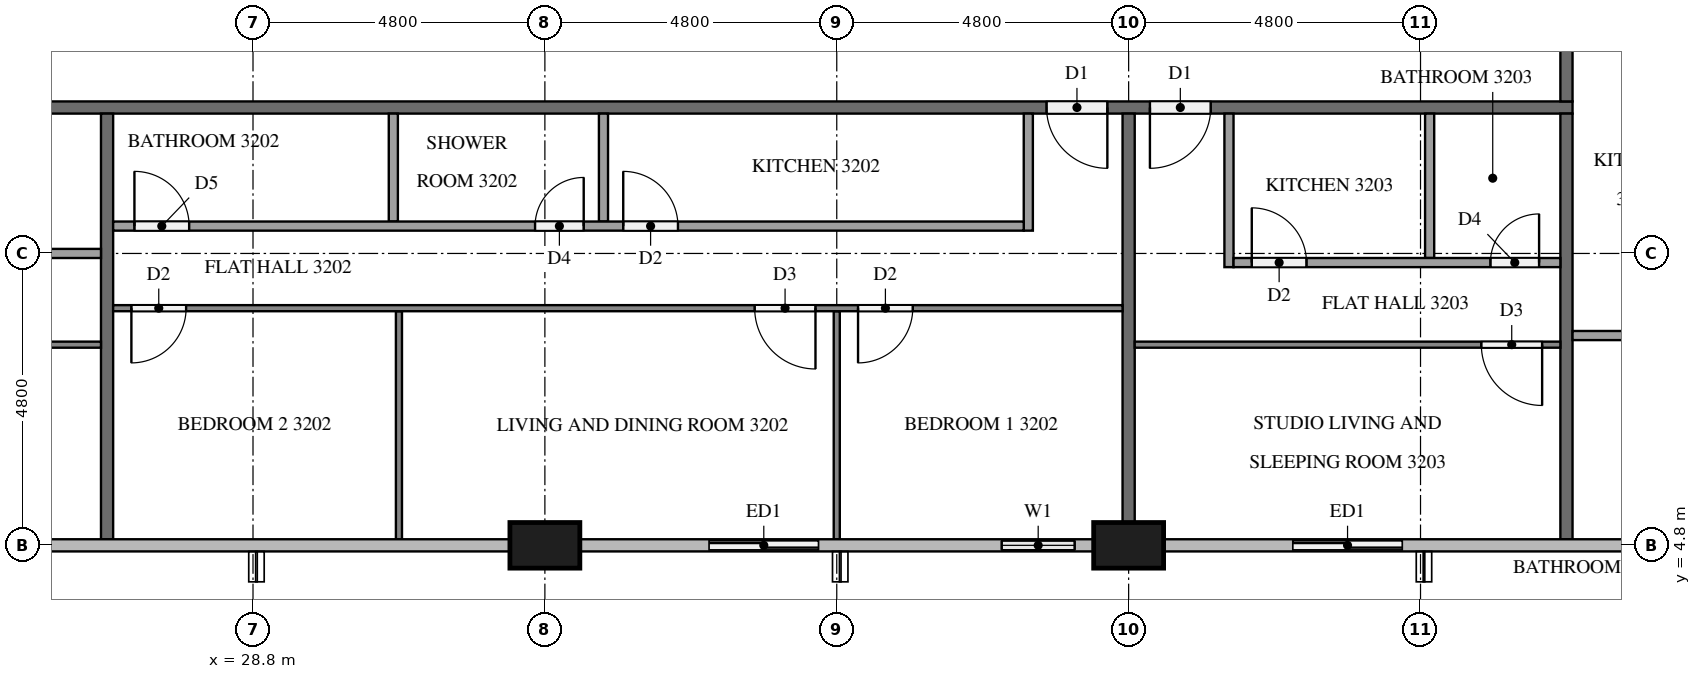
"""IFC4 building model, lengths in metres.
Left out: names, types, materials, properties, quantities, classifications, styles, units other than length and angle.
Written with IfcOpenShell. Run it as: python <this file> out.ifc"""

import sys

from ifc_helpers import new_model, si_unit, direction, frame, frame_2d, origin, origin_2d, place, context, subcontext, project, spatial, rectangle, extrude, element, fill, save


model = new_model("IFC4")
c1 = context("Model", 3, precision=1e-05, world=origin(), true_north=direction((0.0, 1.0)))
c2 = subcontext(c1, "Body", "Model", "MODEL_VIEW")
j1 = project(units=[si_unit("LENGTHUNIT", "METRE"), si_unit("PLANEANGLEUNIT", "RADIAN")], contexts=[c1])
p1 = place(None, origin())
s1 = spatial("IfcSite", under=j1, at=p1, CompositionType="ELEMENT")
p2 = place(p1, origin())
s2 = spatial("IfcBuilding", under=s1, at=p2, CompositionType="ELEMENT")
p3 = place(p2, frame((0.0, 0.0, 126.1)))
s3 = spatial("IfcBuildingStorey", under=s2, at=p3, CompositionType="ELEMENT", Elevation=126.1)
for number, where, z_axis, x_axis in (
    (1, (33.6, 4.8, 0.0), (0.0, 0.0, 1.0), (1.0, 0.0, 0.0)),
    (2, (43.2, 4.8, 0.0), (0.0, 0.0, 1.0), (1.0, 0.0, 0.0)),
):
    element("IfcColumn", number, at=place(p3, frame(where, z_axis=z_axis, x_axis=x_axis)), inside=s3, PredefinedType="COLUMN", context=c2, shape_type="SweptSolid", body=[
        extrude(rectangle(XDim=1.15, YDim=0.75, at=origin_2d()), origin(), (0.0, 0.0, 1.0), 3.2),
    ])
p4 = place(p3, frame((36.0, 4.8, 0.0), z_axis=(0.0, 0.0, 1.0), x_axis=(1.0, 0.0, 0.0)))
e3 = element("IfcWall", 3, at=p4, inside=s3, PredefinedType="SOLIDWALL", context=c2, shape_type="SweptSolid", body=[
    extrude(rectangle(XDim=2.4, YDim=0.15, at=frame_2d((1.2, 0.0))), origin(), (0.0, 0.0, 1.0), 3.2),
])
p5 = place(p4, frame((0.3, 0.0, 0.0)))
e4 = element("IfcOpeningElement", 4, at=p5, cuts=e3, PredefinedType="OPENING", context=c2, shape_type="SweptSolid", body=[
    extrude(rectangle(XDim=1.8, YDim=2.4, at=frame_2d((0.9, 1.2))), frame((0.0, 0.085, 0.0), z_axis=(0.0, -1.0, 0.0), x_axis=(1.0, 0.0, 0.0)), (0.0, 0.0, 1.0), 0.17),
])
p6 = place(p3, frame((40.8, 4.8, 0.0), z_axis=(0.0, 0.0, 1.0), x_axis=(1.0, 0.0, 0.0)))
e5 = element("IfcWall", 5, at=p6, inside=s3, PredefinedType="SOLIDWALL", context=c2, shape_type="SweptSolid", body=[
    extrude(rectangle(XDim=1.825, YDim=0.15, at=frame_2d((0.913, 0.0))), origin(), (0.0, 0.0, 1.0), 3.2),
])
p7 = place(p6, frame((0.312, 0.0, 0.9)))
e6 = element("IfcOpeningElement", 6, at=p7, cuts=e5, PredefinedType="OPENING", context=c2, shape_type="SweptSolid", body=[
    extrude(rectangle(XDim=1.2, YDim=1.4, at=frame_2d((0.6, 0.7))), frame((0.0, 0.085, 0.0), z_axis=(0.0, -1.0, 0.0), x_axis=(1.0, 0.0, 0.0)), (0.0, 0.0, 1.0), 0.17),
])
p8 = place(p3, frame((45.6, 4.8, 0.0), z_axis=(0.0, 0.0, 1.0), x_axis=(1.0, 0.0, 0.0)))
e7 = element("IfcWall", 7, at=p8, inside=s3, PredefinedType="SOLIDWALL", context=c2, shape_type="SweptSolid", body=[
    extrude(rectangle(XDim=2.4, YDim=0.15, at=frame_2d((1.2, 0.0))), origin(), (0.0, 0.0, 1.0), 3.2),
])
p9 = place(p8, frame((0.3, 0.0, 0.0)))
e8 = element("IfcOpeningElement", 8, at=p9, cuts=e7, PredefinedType="OPENING", context=c2, shape_type="SweptSolid", body=[
    extrude(rectangle(XDim=1.8, YDim=2.4, at=frame_2d((0.9, 1.2))), frame((0.0, 0.085, 0.0), z_axis=(0.0, -1.0, 0.0), x_axis=(1.0, 0.0, 0.0)), (0.0, 0.0, 1.0), 0.17),
])
p10 = place(p3, frame((50.5, 12.0, 0.0), z_axis=(0.0, 0.0, 1.0), x_axis=(-1.0, 0.0, 0.0)))
e9 = element("IfcWall", 9, at=p10, inside=s3, PredefinedType="PARTITIONING", context=c2, shape_type="SweptSolid", body=[
    extrude(rectangle(XDim=38.6, YDim=0.2, at=frame_2d((19.3, 0.0))), origin(), (0.0, 0.0, 1.0), 3.2),
])
p11 = place(p10, frame((37.15, 0.0, 0.0)))
e10 = element("IfcOpeningElement", 10, at=p11, cuts=e9, PredefinedType="OPENING", context=c2, shape_type="SweptSolid", body=[
    extrude(rectangle(XDim=1.0, YDim=2.1, at=frame_2d((0.5, 1.05))), frame((0.0, 0.11, 0.0), z_axis=(0.0, -1.0, 0.0), x_axis=(1.0, 0.0, 0.0)), (0.0, 0.0, 1.0), 0.22),
])
p12 = place(p10, frame((7.65, 0.0, 0.0)))
e11 = element("IfcOpeningElement", 11, at=p12, cuts=e9, PredefinedType="OPENING", context=c2, shape_type="SweptSolid", body=[
    extrude(rectangle(XDim=1.0, YDim=2.1, at=frame_2d((0.5, 1.05))), frame((0.0, 0.11, 0.0), z_axis=(0.0, -1.0, 0.0), x_axis=(1.0, 0.0, 0.0)), (0.0, 0.0, 1.0), 0.22),
])
p13 = place(p10, frame((5.95, 0.0, 0.0)))
e12 = element("IfcOpeningElement", 12, at=p13, cuts=e9, PredefinedType="OPENING", context=c2, shape_type="SweptSolid", body=[
    extrude(rectangle(XDim=1.0, YDim=2.1, at=frame_2d((0.5, 1.05))), frame((0.0, 0.11, 0.0), z_axis=(0.0, -1.0, 0.0), x_axis=(1.0, 0.0, 0.0)), (0.0, 0.0, 1.0), 0.22),
])
p14 = place(p3, frame((50.4, 14.9, 0.0), z_axis=(0.0, 0.0, 1.0), x_axis=(0.0, -1.0, 0.0)))
e13 = element("IfcWall", 13, at=p14, inside=s3, PredefinedType="PARTITIONING", context=c2, shape_type="SweptSolid", body=[
    extrude(rectangle(XDim=2.8, YDim=0.2, at=frame_2d((1.4, 0.0))), origin(), (0.0, 0.0, 1.0), 3.2),
])
p15 = place(p14, frame((0.25, 0.0, 0.0)))
e14 = element("IfcOpeningElement", 14, at=p15, cuts=e13, PredefinedType="OPENING", context=c2, shape_type="SweptSolid", body=[
    extrude(rectangle(XDim=1.0, YDim=2.1, at=frame_2d((0.5, 1.05))), frame((0.0, 0.11, 0.0), z_axis=(0.0, -1.0, 0.0), x_axis=(1.0, 0.0, 0.0)), (0.0, 0.0, 1.0), 0.22),
])
p16 = place(p3, frame((26.4, 11.9, 0.0), z_axis=(0.0, 0.0, 1.0), x_axis=(0.0, -1.0, 0.0)))
e15 = element("IfcWall", 15, at=p16, inside=s3, PredefinedType="PARTITIONING", context=c2, shape_type="SweptSolid", body=[
    extrude(rectangle(XDim=7.0, YDim=0.2, at=frame_2d((3.5, 0.0))), origin(), (0.0, 0.0, 1.0), 3.2),
])
p17 = place(p3, frame((43.2, 11.9, 0.0), z_axis=(0.0, 0.0, 1.0), x_axis=(0.0, -1.0, 0.0)))
e16 = element("IfcWall", 16, at=p17, inside=s3, PredefinedType="PARTITIONING", context=c2, shape_type="SweptSolid", body=[
    extrude(rectangle(XDim=6.725, YDim=0.2, at=frame_2d((3.362, 0.0))), origin(), (0.0, 0.0, 1.0), 3.2),
])
p18 = place(p3, frame((50.4, 11.9, 0.0), z_axis=(0.0, 0.0, 1.0), x_axis=(0.0, -1.0, 0.0)))
e17 = element("IfcWall", 17, at=p18, inside=s3, PredefinedType="PARTITIONING", context=c2, shape_type="SweptSolid", body=[
    extrude(rectangle(XDim=7.0, YDim=0.2, at=frame_2d((3.5, 0.0))), origin(), (0.0, 0.0, 1.0), 3.2),
])
p19 = place(p3, frame((26.3, 8.1, 0.0), z_axis=(0.0, 0.0, 1.0), x_axis=(-1.0, 0.0, 0.0)))
e18 = element("IfcWall", 18, at=p19, inside=s3, PredefinedType="PARTITIONING", context=c2, shape_type="SweptSolid", body=[
    extrude(rectangle(XDim=14.2, YDim=0.1, at=frame_2d((7.1, 0.0))), origin(), (0.0, 0.0, 1.0), 3.2),
])
p20 = place(p19, frame((13.0, 0.0, 0.0)))
e19 = element("IfcOpeningElement", 19, at=p20, cuts=e18, PredefinedType="OPENING", context=c2, shape_type="SweptSolid", body=[
    extrude(rectangle(XDim=0.9, YDim=2.1, at=frame_2d((0.45, 1.05))), frame((0.0, 0.06, 0.0), z_axis=(0.0, -1.0, 0.0), x_axis=(1.0, 0.0, 0.0)), (0.0, 0.0, 1.0), 0.12),
])
p21 = place(p19, frame((5.05, 0.0, 0.0)))
e20 = element("IfcOpeningElement", 20, at=p21, cuts=e18, PredefinedType="OPENING", context=c2, shape_type="SweptSolid", body=[
    extrude(rectangle(XDim=0.9, YDim=2.1, at=frame_2d((0.45, 1.05))), frame((0.0, 0.06, 0.0), z_axis=(0.0, -1.0, 0.0), x_axis=(1.0, 0.0, 0.0)), (0.0, 0.0, 1.0), 0.12),
])
p22 = place(p19, frame((3.35, 0.0, 0.0)))
e21 = element("IfcOpeningElement", 21, at=p22, cuts=e18, PredefinedType="OPENING", context=c2, shape_type="SweptSolid", body=[
    extrude(rectangle(XDim=1.0, YDim=2.1, at=frame_2d((0.5, 1.05))), frame((0.0, 0.06, 0.0), z_axis=(0.0, -1.0, 0.0), x_axis=(1.0, 0.0, 0.0)), (0.0, 0.0, 1.0), 0.12),
])
p23 = place(p3, frame((13.725, 9.6, 0.0), z_axis=(0.0, 0.0, 1.0), x_axis=(1.0, 0.0, 0.0)))
e22 = element("IfcWall", 22, at=p23, inside=s3, PredefinedType="PARTITIONING", context=c2, shape_type="SweptSolid", body=[
    extrude(rectangle(XDim=12.575, YDim=0.15, at=frame_2d((6.288, 0.0))), origin(), (0.0, 0.0, 1.0), 3.2),
])
p24 = place(p23, frame((0.3, 0.0, 0.0)))
e23 = element("IfcOpeningElement", 23, at=p24, cuts=e22, PredefinedType="OPENING", context=c2, shape_type="SweptSolid", body=[
    extrude(rectangle(XDim=0.8, YDim=2.1, at=frame_2d((0.4, 1.05))), frame((0.0, 0.085, 0.0), z_axis=(0.0, -1.0, 0.0), x_axis=(1.0, 0.0, 0.0)), (0.0, 0.0, 1.0), 0.17),
])
p25 = place(p23, frame((5.546, 0.0, 0.0)))
e24 = element("IfcOpeningElement", 24, at=p25, cuts=e22, PredefinedType="OPENING", context=c2, shape_type="SweptSolid", body=[
    extrude(rectangle(XDim=0.9, YDim=2.1, at=frame_2d((0.45, 1.05))), frame((0.0, 0.085, 0.0), z_axis=(0.0, -1.0, 0.0), x_axis=(1.0, 0.0, 0.0)), (0.0, 0.0, 1.0), 0.17),
])
p26 = place(p23, frame((7.096, 0.0, 0.0)))
e25 = element("IfcOpeningElement", 25, at=p26, cuts=e22, PredefinedType="OPENING", context=c2, shape_type="SweptSolid", body=[
    extrude(rectangle(XDim=0.9, YDim=2.1, at=frame_2d((0.45, 1.05))), frame((0.0, 0.085, 0.0), z_axis=(0.0, -1.0, 0.0), x_axis=(1.0, 0.0, 0.0)), (0.0, 0.0, 1.0), 0.17),
])
for number, where, z_axis, x_axis in (
    (26, (38.4, 8.65, 0.0), (0.0, 0.0, 1.0), (0.0, -1.0, 0.0)),
    (27, (31.2, 8.65, 0.0), (0.0, 0.0, 1.0), (0.0, -1.0, 0.0)),
):
    element("IfcWall", number, at=place(p3, frame(where, z_axis=z_axis, x_axis=x_axis)), inside=s3, PredefinedType="PARTITIONING", context=c2, shape_type="SweptSolid", body=[
        extrude(rectangle(XDim=3.75, YDim=0.1, at=frame_2d((1.875, 0.0))), origin(), (0.0, 0.0, 1.0), 3.2),
    ])
p27 = place(p3, frame((43.1, 8.7, 0.0), z_axis=(0.0, 0.0, 1.0), x_axis=(-1.0, 0.0, 0.0)))
e28 = element("IfcWall", 28, at=p27, inside=s3, PredefinedType="PARTITIONING", context=c2, shape_type="SweptSolid", body=[
    extrude(rectangle(XDim=16.6, YDim=0.1, at=frame_2d((8.3, 0.0))), origin(), (0.0, 0.0, 1.0), 3.2),
])
p28 = place(p27, frame((3.45, 0.0, 0.0)))
e29 = element("IfcOpeningElement", 29, at=p28, cuts=e28, PredefinedType="OPENING", context=c2, shape_type="SweptSolid", body=[
    extrude(rectangle(XDim=0.9, YDim=2.1, at=frame_2d((0.45, 1.05))), frame((0.0, 0.06, 0.0), z_axis=(0.0, -1.0, 0.0), x_axis=(1.0, 0.0, 0.0)), (0.0, 0.0, 1.0), 0.12),
])
p29 = place(p27, frame((5.05, 0.0, 0.0)))
e30 = element("IfcOpeningElement", 30, at=p29, cuts=e28, PredefinedType="OPENING", context=c2, shape_type="SweptSolid", body=[
    extrude(rectangle(XDim=1.0, YDim=2.1, at=frame_2d((0.5, 1.05))), frame((0.0, 0.06, 0.0), z_axis=(0.0, -1.0, 0.0), x_axis=(1.0, 0.0, 0.0)), (0.0, 0.0, 1.0), 0.12),
])
p30 = place(p27, frame((15.4, 0.0, 0.0)))
e31 = element("IfcOpeningElement", 31, at=p30, cuts=e28, PredefinedType="OPENING", context=c2, shape_type="SweptSolid", body=[
    extrude(rectangle(XDim=0.9, YDim=2.1, at=frame_2d((0.45, 1.05))), frame((0.0, 0.06, 0.0), z_axis=(0.0, -1.0, 0.0), x_axis=(1.0, 0.0, 0.0)), (0.0, 0.0, 1.0), 0.12),
])
for number, where, z_axis, x_axis in (
    (32, (34.563, 11.9, 0.0), (0.0, 0.0, 1.0), (0.0, -1.0, 0.0)),
    (33, (31.108, 11.9, 0.0), (0.0, 0.0, 1.0), (0.0, -1.0, 0.0)),
):
    element("IfcWall", number, at=place(p3, frame(where, z_axis=z_axis, x_axis=x_axis)), inside=s3, PredefinedType="PARTITIONING", context=c2, shape_type="SweptSolid", body=[
        extrude(rectangle(XDim=1.775, YDim=0.15, at=frame_2d((0.887, 0.0))), origin(), (0.0, 0.0, 1.0), 3.2),
    ])
p31 = place(p3, frame((41.55, 11.9, 0.0), z_axis=(0.0, 0.0, 1.0), x_axis=(0.0, -1.0, 0.0)))
e34 = element("IfcWall", 34, at=p31, inside=s3, PredefinedType="PARTITIONING", context=c2, shape_type="SweptSolid", body=[
    extrude(rectangle(XDim=1.925, YDim=0.15, at=frame_2d((0.962, 0.0))), origin(), (0.0, 0.0, 1.0), 3.2),
])
p32 = place(p3, frame((26.5, 10.05, 0.0), z_axis=(0.0, 0.0, 1.0), x_axis=(1.0, 0.0, 0.0)))
e35 = element("IfcWall", 35, at=p32, inside=s3, PredefinedType="PARTITIONING", context=c2, shape_type="SweptSolid", body=[
    extrude(rectangle(XDim=14.975, YDim=0.15, at=frame_2d((7.488, 0.0))), origin(), (0.0, 0.0, 1.0), 3.2),
])
p33 = place(p32, frame((8.388, 0.0, 0.0)))
e36 = element("IfcOpeningElement", 36, at=p33, cuts=e35, PredefinedType="OPENING", context=c2, shape_type="SweptSolid", body=[
    extrude(rectangle(XDim=0.9, YDim=2.1, at=frame_2d((0.45, 1.05))), frame((0.0, 0.085, 0.0), z_axis=(0.0, -1.0, 0.0), x_axis=(1.0, 0.0, 0.0)), (0.0, 0.0, 1.0), 0.17),
])
p34 = place(p32, frame((6.938, 0.0, 0.0)))
e37 = element("IfcOpeningElement", 37, at=p34, cuts=e35, PredefinedType="OPENING", context=c2, shape_type="SweptSolid", body=[
    extrude(rectangle(XDim=0.8, YDim=2.1, at=frame_2d((0.4, 1.05))), frame((0.0, 0.085, 0.0), z_axis=(0.0, -1.0, 0.0), x_axis=(1.0, 0.0, 0.0)), (0.0, 0.0, 1.0), 0.17),
])
p35 = place(p32, frame((0.35, 0.0, 0.0)))
e38 = element("IfcOpeningElement", 38, at=p35, cuts=e35, PredefinedType="OPENING", context=c2, shape_type="SweptSolid", body=[
    extrude(rectangle(XDim=0.9, YDim=2.1, at=frame_2d((0.45, 1.05))), frame((0.0, 0.085, 0.0), z_axis=(0.0, -1.0, 0.0), x_axis=(1.0, 0.0, 0.0)), (0.0, 0.0, 1.0), 0.17),
])
p36 = place(p3, frame((50.3, 8.1, 0.0), z_axis=(0.0, 0.0, 1.0), x_axis=(-1.0, 0.0, 0.0)))
e39 = element("IfcWall", 39, at=p36, inside=s3, PredefinedType="PARTITIONING", context=c2, shape_type="SweptSolid", body=[
    extrude(rectangle(XDim=7.0, YDim=0.1, at=frame_2d((3.5, 0.0))), origin(), (0.0, 0.0, 1.0), 3.2),
])
p37 = place(p36, frame((0.3, 0.0, 0.0)))
e40 = element("IfcOpeningElement", 40, at=p37, cuts=e39, PredefinedType="OPENING", context=c2, shape_type="SweptSolid", body=[
    extrude(rectangle(XDim=1.0, YDim=2.1, at=frame_2d((0.5, 1.05))), frame((0.0, 0.06, 0.0), z_axis=(0.0, -1.0, 0.0), x_axis=(1.0, 0.0, 0.0)), (0.0, 0.0, 1.0), 0.12),
])
p38 = place(p3, frame((48.15, 11.9, 0.0), z_axis=(0.0, 0.0, 1.0), x_axis=(0.0, -1.0, 0.0)))
e41 = element("IfcWall", 41, at=p38, inside=s3, PredefinedType="PARTITIONING", context=c2, shape_type="SweptSolid", body=[
    extrude(rectangle(XDim=2.375, YDim=0.15, at=frame_2d((1.188, 0.0))), origin(), (0.0, 0.0, 1.0), 3.2),
])
p39 = place(p3, frame((44.85, 11.9, 0.0), z_axis=(0.0, 0.0, 1.0), x_axis=(0.0, -1.0, 0.0)))
e42 = element("IfcWall", 42, at=p39, inside=s3, PredefinedType="PARTITIONING", context=c2, shape_type="SweptSolid", body=[
    extrude(rectangle(XDim=2.525, YDim=0.15, at=frame_2d((1.262, 0.0))), origin(), (0.0, 0.0, 1.0), 3.2),
])
p40 = place(p3, frame((44.925, 9.45, 0.0), z_axis=(0.0, 0.0, 1.0), x_axis=(1.0, 0.0, 0.0)))
e43 = element("IfcWall", 43, at=p40, inside=s3, PredefinedType="PARTITIONING", context=c2, shape_type="SweptSolid", body=[
    extrude(rectangle(XDim=5.375, YDim=0.15, at=frame_2d((2.688, 0.0))), origin(), (0.0, 0.0, 1.0), 3.2),
])
p41 = place(p40, frame((0.3, 0.0, 0.0)))
e44 = element("IfcOpeningElement", 44, at=p41, cuts=e43, PredefinedType="OPENING", context=c2, shape_type="SweptSolid", body=[
    extrude(rectangle(XDim=0.9, YDim=2.1, at=frame_2d((0.45, 1.05))), frame((0.0, 0.085, 0.0), z_axis=(0.0, -1.0, 0.0), x_axis=(1.0, 0.0, 0.0)), (0.0, 0.0, 1.0), 0.17),
])
p42 = place(p40, frame((4.225, 0.0, 0.0)))
e45 = element("IfcOpeningElement", 45, at=p42, cuts=e43, PredefinedType="OPENING", context=c2, shape_type="SweptSolid", body=[
    extrude(rectangle(XDim=0.8, YDim=2.1, at=frame_2d((0.4, 1.05))), frame((0.0, 0.085, 0.0), z_axis=(0.0, -1.0, 0.0), x_axis=(1.0, 0.0, 0.0)), (0.0, 0.0, 1.0), 0.17),
])
p43 = place(p3, frame((50.5, 8.25, 0.0), z_axis=(0.0, 0.0, 1.0), x_axis=(1.0, 0.0, 0.0)))
e46 = element("IfcWall", 46, at=p43, inside=s3, PredefinedType="PARTITIONING", context=c2, shape_type="SweptSolid", body=[
    extrude(rectangle(XDim=2.075, YDim=0.15, at=frame_2d((1.038, 0.0))), origin(), (0.0, 0.0, 1.0), 3.2),
])
p44 = place(p5, origin())
e47 = element("IfcDoor", 47, at=p44, inside=s3, OperationType="SLIDING_TO_LEFT", PredefinedType="DOOR", context=c2, shape_type="SweptSolid", body=[
    extrude(rectangle(XDim=1.8, YDim=2.4, at=frame_2d((0.9, 1.2))), frame((0.0, 0.025, 0.0), z_axis=(0.0, -1.0, 0.0), x_axis=(1.0, 0.0, 0.0)), (0.0, 0.0, 1.0), 0.05),
])
fill(e4, e47)
p45 = place(p7, origin())
e48 = element("IfcWindow", 48, at=p45, inside=s3, PartitioningType="SINGLE_PANEL", PredefinedType="WINDOW", context=c2, shape_type="SweptSolid", body=[
    extrude(rectangle(XDim=1.2, YDim=1.4, at=frame_2d((0.6, 0.7))), frame((0.0, 0.03, 0.0), z_axis=(0.0, -1.0, 0.0), x_axis=(1.0, 0.0, 0.0)), (0.0, 0.0, 1.0), 0.06),
])
fill(e6, e48)
p46 = place(p9, origin())
e49 = element("IfcDoor", 49, at=p46, inside=s3, OperationType="SLIDING_TO_RIGHT", PredefinedType="DOOR", context=c2, shape_type="SweptSolid", body=[
    extrude(rectangle(XDim=1.8, YDim=2.4, at=frame_2d((0.9, 1.2))), frame((0.0, 0.025, 0.0), z_axis=(0.0, -1.0, 0.0), x_axis=(1.0, 0.0, 0.0)), (0.0, 0.0, 1.0), 0.05),
])
fill(e8, e49)
p47 = place(p12, origin())
e50 = element("IfcDoor", 50, at=p47, inside=s3, OperationType="SINGLE_SWING_LEFT", PredefinedType="DOOR", context=c2, shape_type="SweptSolid", body=[
    extrude(rectangle(XDim=1.0, YDim=2.1, at=frame_2d((0.5, 1.05))), frame((0.0, 0.025, 0.0), z_axis=(0.0, -1.0, 0.0), x_axis=(1.0, 0.0, 0.0)), (0.0, 0.0, 1.0), 0.05),
])
fill(e11, e50)
p48 = place(p13, origin())
e51 = element("IfcDoor", 51, at=p48, inside=s3, OperationType="SINGLE_SWING_RIGHT", PredefinedType="DOOR", context=c2, shape_type="SweptSolid", body=[
    extrude(rectangle(XDim=1.0, YDim=2.1, at=frame_2d((0.5, 1.05))), frame((0.0, 0.025, 0.0), z_axis=(0.0, -1.0, 0.0), x_axis=(1.0, 0.0, 0.0)), (0.0, 0.0, 1.0), 0.05),
])
fill(e12, e51)
p49 = place(p28, origin())
e52 = element("IfcDoor", 52, at=p49, inside=s3, OperationType="SINGLE_SWING_RIGHT", PredefinedType="DOOR", context=c2, shape_type="SweptSolid", body=[
    extrude(rectangle(XDim=0.9, YDim=2.1, at=frame_2d((0.45, 1.05))), frame((0.0, 0.025, 0.0), z_axis=(0.0, -1.0, 0.0), x_axis=(1.0, 0.0, 0.0)), (0.0, 0.0, 1.0), 0.05),
])
fill(e29, e52)
p50 = place(p29, origin())
e53 = element("IfcDoor", 53, at=p50, inside=s3, OperationType="SINGLE_SWING_LEFT", PredefinedType="DOOR", context=c2, shape_type="SweptSolid", body=[
    extrude(rectangle(XDim=1.0, YDim=2.1, at=frame_2d((0.5, 1.05))), frame((0.0, 0.025, 0.0), z_axis=(0.0, -1.0, 0.0), x_axis=(1.0, 0.0, 0.0)), (0.0, 0.0, 1.0), 0.05),
])
fill(e30, e53)
p51 = place(p30, origin())
e54 = element("IfcDoor", 54, at=p51, inside=s3, OperationType="SINGLE_SWING_RIGHT", PredefinedType="DOOR", context=c2, shape_type="SweptSolid", body=[
    extrude(rectangle(XDim=0.9, YDim=2.1, at=frame_2d((0.45, 1.05))), frame((0.0, 0.025, 0.0), z_axis=(0.0, -1.0, 0.0), x_axis=(1.0, 0.0, 0.0)), (0.0, 0.0, 1.0), 0.05),
])
fill(e31, e54)
p52 = place(p33, origin())
e55 = element("IfcDoor", 55, at=p52, inside=s3, OperationType="SINGLE_SWING_LEFT", PredefinedType="DOOR", context=c2, shape_type="SweptSolid", body=[
    extrude(rectangle(XDim=0.9, YDim=2.1, at=frame_2d((0.45, 1.05))), frame((0.0, 0.025, 0.0), z_axis=(0.0, -1.0, 0.0), x_axis=(1.0, 0.0, 0.0)), (0.0, 0.0, 1.0), 0.05),
])
fill(e36, e55)
p53 = place(p34, origin())
e56 = element("IfcDoor", 56, at=p53, inside=s3, OperationType="SINGLE_SWING_RIGHT", PredefinedType="DOOR", context=c2, shape_type="SweptSolid", body=[
    extrude(rectangle(XDim=0.8, YDim=2.1, at=frame_2d((0.4, 1.05))), frame((0.0, 0.025, 0.0), z_axis=(0.0, -1.0, 0.0), x_axis=(1.0, 0.0, 0.0)), (0.0, 0.0, 1.0), 0.05),
])
fill(e37, e56)
p54 = place(p35, origin())
e57 = element("IfcDoor", 57, at=p54, inside=s3, OperationType="SINGLE_SWING_LEFT", PredefinedType="DOOR", context=c2, shape_type="SweptSolid", body=[
    extrude(rectangle(XDim=0.9, YDim=2.1, at=frame_2d((0.45, 1.05))), frame((0.0, 0.025, 0.0), z_axis=(0.0, -1.0, 0.0), x_axis=(1.0, 0.0, 0.0)), (0.0, 0.0, 1.0), 0.05),
])
fill(e38, e57)
p55 = place(p37, origin())
e58 = element("IfcDoor", 58, at=p55, inside=s3, OperationType="SINGLE_SWING_LEFT", PredefinedType="DOOR", context=c2, shape_type="SweptSolid", body=[
    extrude(rectangle(XDim=1.0, YDim=2.1, at=frame_2d((0.5, 1.05))), frame((0.0, 0.025, 0.0), z_axis=(0.0, -1.0, 0.0), x_axis=(1.0, 0.0, 0.0)), (0.0, 0.0, 1.0), 0.05),
])
fill(e40, e58)
p56 = place(p41, origin())
e59 = element("IfcDoor", 59, at=p56, inside=s3, OperationType="SINGLE_SWING_LEFT", PredefinedType="DOOR", context=c2, shape_type="SweptSolid", body=[
    extrude(rectangle(XDim=0.9, YDim=2.1, at=frame_2d((0.45, 1.05))), frame((0.0, 0.025, 0.0), z_axis=(0.0, -1.0, 0.0), x_axis=(1.0, 0.0, 0.0)), (0.0, 0.0, 1.0), 0.05),
])
fill(e44, e59)
p57 = place(p42, origin())
e60 = element("IfcDoor", 60, at=p57, inside=s3, OperationType="SINGLE_SWING_RIGHT", PredefinedType="DOOR", context=c2, shape_type="SweptSolid", body=[
    extrude(rectangle(XDim=0.8, YDim=2.1, at=frame_2d((0.4, 1.05))), frame((0.0, 0.025, 0.0), z_axis=(0.0, -1.0, 0.0), x_axis=(1.0, 0.0, 0.0)), (0.0, 0.0, 1.0), 0.05),
])
fill(e45, e60)
save(model, sys.argv[1])
